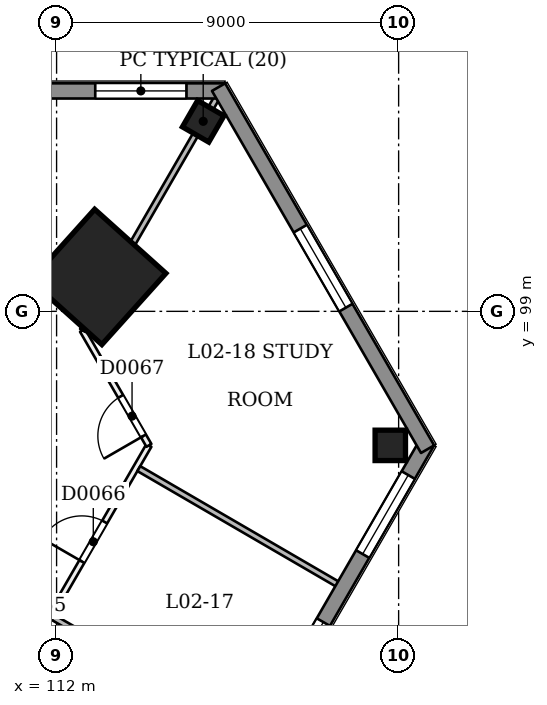
"""IFC4 building model, lengths in metres.
Left out: names, types, materials, properties, quantities, classifications, styles, units other than length and angle.
Written with IfcOpenShell. Run it as: python <this file> out.ifc"""

import sys

from ifc_helpers import new_model, si_unit, direction, frame, frame_2d, origin, origin_2d, place, context, subcontext, project, spatial, rectangle, extrude, element, fill, save


model = new_model("IFC4")
c1 = context("Model", 3, precision=1e-05, world=origin(), true_north=direction((0.0, 1.0)))
c2 = subcontext(c1, "Body", "Model", "MODEL_VIEW")
j1 = project(units=[si_unit("LENGTHUNIT", "METRE"), si_unit("PLANEANGLEUNIT", "RADIAN")], contexts=[c1])
p1 = place(None, origin())
s1 = spatial("IfcSite", under=j1, at=p1, CompositionType="ELEMENT")
p2 = place(p1, origin())
s2 = spatial("IfcBuilding", under=s1, at=p2, CompositionType="ELEMENT")
p3 = place(p2, frame((0.0, 0.0, 13.5)))
s3 = spatial("IfcBuildingStorey", under=s2, at=p3, CompositionType="ELEMENT", Elevation=13.5)
p4 = place(p3, frame((113.131, 99.895, 0.0), z_axis=(-0.028361930921, 0.009273212596, 0.999554705057), x_axis=(0.498900930689, -0.866374802629, 0.022193754232)))
e1 = element("IfcColumn", 1, at=p4, inside=s3, PredefinedType="COLUMN", context=c2, shape_type="SweptSolid", body=[
    extrude(rectangle(XDim=2.52, YDim=2.52, at=origin_2d()), origin(), (0.0, 0.0, 1.0), 4.502),
])
for number, where, z_axis, x_axis in (
    (2, (115.858, 104.0, 0.0), (0.0, 0.0, 1.0), (0.5, 0.866, 0.0)),
    (3, (120.781, 95.474, 0.0), (0.0, 0.0, 1.0), (1.745e-08, 1.0, 0.0)),
):
    element("IfcColumn", number, at=place(p3, frame(where, z_axis=z_axis, x_axis=x_axis)), inside=s3, PredefinedType="COLUMN", context=c2, shape_type="SweptSolid", body=[
        extrude(rectangle(XDim=0.8, YDim=0.8, at=origin_2d()), origin(), (0.0, 0.0, 1.0), 4.5),
    ])
p5 = place(p3, frame((86.747, 47.526, 0.0), z_axis=(0.0, 0.0, 1.0), x_axis=(0.500000085768, 0.866025354266, 0.0)))
e4 = element("IfcWall", 4, at=p5, inside=s3, PredefinedType="PARTITIONING", context=c2, shape_type="SweptSolid", body=[
    extrude(rectangle(XDim=55.365, YDim=0.15, at=frame_2d((27.682, 0.0))), origin(), (0.0, 0.0, 1.0), 4.05),
])
p6 = place(p5, frame((0.97, 0.0, 0.0)))
e5 = element("IfcOpeningElement", 5, at=p6, cuts=e4, PredefinedType="OPENING", context=c2, shape_type="SweptSolid", body=[
    extrude(rectangle(XDim=1.2, YDim=2.1, at=frame_2d((0.6, 1.05))), frame((0.0, 0.085, 0.0), z_axis=(0.0, -1.0, 0.0), x_axis=(1.0, 0.0, 0.0)), (0.0, 0.0, 1.0), 0.171),
])
p7 = place(p5, frame((11.332, 0.0, 0.0)))
e6 = element("IfcOpeningElement", 6, at=p7, cuts=e4, PredefinedType="OPENING", context=c2, shape_type="SweptSolid", body=[
    extrude(rectangle(XDim=1.2, YDim=2.1, at=frame_2d((0.6, 1.05))), frame((0.0, 0.085, 0.0), z_axis=(0.0, -1.0, 0.0), x_axis=(1.0, 0.0, 0.0)), (0.0, 0.0, 1.0), 0.171),
])
p8 = place(p5, frame((29.332, 0.0, 0.0)))
e7 = element("IfcOpeningElement", 7, at=p8, cuts=e4, PredefinedType="OPENING", context=c2, shape_type="SweptSolid", body=[
    extrude(rectangle(XDim=1.2, YDim=2.1, at=frame_2d((0.6, 1.05))), frame((0.0, 0.085, 0.0), z_axis=(0.0, -1.0, 0.0), x_axis=(1.0, 0.0, 0.0)), (0.0, 0.0, 1.0), 0.171),
])
p9 = place(p5, frame((42.132, 0.0, 0.0)))
e8 = element("IfcOpeningElement", 8, at=p9, cuts=e4, PredefinedType="OPENING", context=c2, shape_type="SweptSolid", body=[
    extrude(rectangle(XDim=1.2, YDim=2.1, at=frame_2d((0.6, 1.05))), frame((0.0, 0.085, 0.0), z_axis=(0.0, -1.0, 0.0), x_axis=(1.0, 0.0, 0.0)), (0.0, 0.0, 1.0), 0.171),
])
p10 = place(p5, frame((46.569, 0.0, 0.0)))
e9 = element("IfcOpeningElement", 9, at=p10, cuts=e4, PredefinedType="OPENING", context=c2, shape_type="SweptSolid", body=[
    extrude(rectangle(XDim=1.0, YDim=2.1, at=frame_2d((0.5, 1.05))), frame((0.0, 0.085, 0.0), z_axis=(0.0, -1.0, 0.0), x_axis=(1.0, 0.0, 0.0)), (0.0, 0.0, 1.0), 0.171),
])
p11 = place(p5, frame((48.819, 0.0, 0.0)))
e10 = element("IfcOpeningElement", 10, at=p11, cuts=e4, PredefinedType="OPENING", context=c2, shape_type="SweptSolid", body=[
    extrude(rectangle(XDim=1.0, YDim=2.1, at=frame_2d((0.5, 1.05))), frame((0.0, 0.085, 0.0), z_axis=(0.0, -1.0, 0.0), x_axis=(1.0, 0.0, 0.0)), (0.0, 0.0, 1.0), 0.171),
])
p12 = place(p5, frame((51.837, 0.0, 0.0)))
e11 = element("IfcOpeningElement", 11, at=p12, cuts=e4, PredefinedType="OPENING", context=c2, shape_type="SweptSolid", body=[
    extrude(rectangle(XDim=1.2, YDim=2.1, at=frame_2d((0.6, 1.05))), frame((0.0, 0.085, 0.0), z_axis=(0.0, -1.0, 0.0), x_axis=(1.0, 0.0, 0.0)), (0.0, 0.0, 1.0), 0.171),
])
p13 = place(p3, frame((114.43, 95.474, 0.0), z_axis=(0.0, 0.0, 1.0), x_axis=(-0.500008701212, 0.866020380079, 0.0)))
e12 = element("IfcWall", 12, at=p13, inside=s3, PredefinedType="PARTITIONING", context=c2, shape_type="SweptSolid", body=[
    extrude(rectangle(XDim=3.495, YDim=0.15, at=frame_2d((1.747, 0.0))), origin(), (0.0, 0.0, 1.0), 4.05),
])
p14 = place(p13, frame((0.288, 0.0, 0.0)))
e13 = element("IfcOpeningElement", 13, at=p14, cuts=e12, PredefinedType="OPENING", context=c2, shape_type="SweptSolid", body=[
    extrude(rectangle(XDim=1.2, YDim=2.1, at=frame_2d((0.6, 1.05))), frame((0.0, 0.085, 0.0), z_axis=(0.0, -1.0, 0.0), x_axis=(1.0, 0.0, 0.0)), (0.0, 0.0, 1.0), 0.171),
])
p15 = place(p3, frame((112.682, 98.5, 0.0), z_axis=(0.0, 0.0, 1.0), x_axis=(0.500126914667, 0.865952117167, 0.0)))
e14 = element("IfcWall", 14, at=p15, inside=s3, PredefinedType="PARTITIONING", context=c2, shape_type="SweptSolid", body=[
    extrude(rectangle(XDim=1.08, YDim=0.15, at=frame_2d((0.54, 0.0))), origin(), (0.0, 0.0, 1.0), 4.05),
])
p16 = place(p3, frame((113.195, 99.538, 0.0), z_axis=(0.0, 0.0, 1.0), x_axis=(-0.866017533419, 0.500013631625, 0.0)))
e15 = element("IfcWall", 15, at=p16, inside=s3, PredefinedType="PARTITIONING", context=c2, shape_type="SweptSolid", body=[
    extrude(rectangle(XDim=2.25, YDim=0.15, at=frame_2d((1.125, 0.0))), origin(), (0.0, 0.0, 1.0), 4.05),
])
p17 = place(p3, frame((117.381, 87.786, 0.0), z_axis=(0.0, 0.0, 1.0), x_axis=(-0.866042250622, 0.499970819286, 0.0)))
e16 = element("IfcWall", 16, at=p17, inside=s3, PredefinedType="PARTITIONING", context=c2, shape_type="SweptSolid", body=[
    extrude(rectangle(XDim=6.325, YDim=0.15, at=frame_2d((3.163, 0.0))), origin(), (0.0, 0.0, 1.0), 4.05),
])
p18 = place(p3, frame((119.631, 91.683, 0.0), z_axis=(0.0, 0.0, 1.0), x_axis=(-0.864489243455, 0.502651318462, 0.0)))
e17 = element("IfcWall", 17, at=p18, inside=s3, PredefinedType="PARTITIONING", context=c2, shape_type="SweptSolid", body=[
    extrude(rectangle(XDim=6.325, YDim=0.15, at=frame_2d((3.163, 0.0))), origin(), (0.0, 0.0, 1.0), 4.05),
])
p19 = place(p3, frame((116.377, 104.9, 0.0), z_axis=(0.0, 0.0, 1.0), x_axis=(-0.500004896655, -0.866022576681, 0.0)))
e18 = element("IfcWall", 18, at=p19, inside=s3, PredefinedType="PARTITIONING", context=c2, shape_type="SweptSolid", body=[
    extrude(rectangle(XDim=6.235, YDim=0.15, at=frame_2d((3.118, 0.0))), origin(), (0.0, 0.0, 1.0), 4.05),
])
p20 = place(p3, frame((53.565, 104.8, 0.0), z_axis=(0.0, 0.0, 1.0), x_axis=(1.0, 0.0, 0.0)))
e19 = element("IfcWall", 19, at=p20, inside=s3, PredefinedType="SOLIDWALL", context=c2, shape_type="SweptSolid", body=[
    extrude(rectangle(XDim=62.871, YDim=0.4, at=frame_2d((31.435, 0.0))), origin(), (0.0, 0.0, 1.0), 4.05),
])
p21 = place(p20, frame((59.452, 0.0, 0.9)))
e20 = element("IfcOpeningElement", 20, at=p21, cuts=e19, PredefinedType="OPENING", context=c2, shape_type="SweptSolid", body=[
    extrude(rectangle(XDim=2.4, YDim=1.5, at=frame_2d((1.2, 0.75))), frame((0.0, 0.21, 0.0), z_axis=(0.0, -1.0, 0.0), x_axis=(1.0, 0.0, 0.0)), (0.0, 0.0, 1.0), 0.421),
])
p22 = place(p20, frame((54.986, 0.0, 0.9)))
e21 = element("IfcOpeningElement", 21, at=p22, cuts=e19, PredefinedType="OPENING", context=c2, shape_type="SweptSolid", body=[
    extrude(rectangle(XDim=2.4, YDim=1.5, at=frame_2d((1.2, 0.75))), frame((0.0, 0.21, 0.0), z_axis=(0.0, -1.0, 0.0), x_axis=(1.0, 0.0, 0.0)), (0.0, 0.0, 1.0), 0.421),
])
p23 = place(p20, frame((45.986, 0.0, 0.9)))
e22 = element("IfcOpeningElement", 22, at=p23, cuts=e19, PredefinedType="OPENING", context=c2, shape_type="SweptSolid", body=[
    extrude(rectangle(XDim=2.4, YDim=1.5, at=frame_2d((1.2, 0.75))), frame((0.0, 0.21, 0.0), z_axis=(0.0, -1.0, 0.0), x_axis=(1.0, 0.0, 0.0)), (0.0, 0.0, 1.0), 0.421),
])
p24 = place(p20, frame((14.486, 0.0, 0.9)))
e23 = element("IfcOpeningElement", 23, at=p24, cuts=e19, PredefinedType="OPENING", context=c2, shape_type="SweptSolid", body=[
    extrude(rectangle(XDim=2.4, YDim=1.5, at=frame_2d((1.2, 0.75))), frame((0.0, 0.21, 0.0), z_axis=(0.0, -1.0, 0.0), x_axis=(1.0, 0.0, 0.0)), (0.0, 0.0, 1.0), 0.421),
])
p25 = place(p20, frame((1.018, 0.0, 0.9)))
e24 = element("IfcOpeningElement", 24, at=p25, cuts=e19, PredefinedType="OPENING", context=c2, shape_type="SweptSolid", body=[
    extrude(rectangle(XDim=2.4, YDim=1.5, at=frame_2d((1.2, 0.75))), frame((0.0, 0.21, 0.0), z_axis=(0.0, -1.0, 0.0), x_axis=(1.0, 0.0, 0.0)), (0.0, 0.0, 1.0), 0.421),
])
p26 = place(p3, frame((121.762, 95.574, 0.0), z_axis=(0.0, 0.0, 1.0), x_axis=(-0.499997306052, -0.866026959131, 0.0)))
e25 = element("IfcWall", 25, at=p26, inside=s3, PredefinedType="SOLIDWALL", context=c2, shape_type="SweptSolid", body=[
    extrude(rectangle(XDim=62.87, YDim=0.4, at=frame_2d((31.435, 0.0))), origin(), (0.0, 0.0, 1.0), 4.05),
])
p27 = place(p26, frame((59.452, 0.0, 0.9)))
e26 = element("IfcOpeningElement", 26, at=p27, cuts=e25, PredefinedType="OPENING", context=c2, shape_type="SweptSolid", body=[
    extrude(rectangle(XDim=2.4, YDim=1.5, at=frame_2d((1.2, 0.75))), frame((0.0, 0.21, 0.0), z_axis=(0.0, -1.0, 0.0), x_axis=(1.0, 0.0, 0.0)), (0.0, 0.0, 1.0), 0.421),
])
p28 = place(p26, frame((54.986, 0.0, 0.9)))
e27 = element("IfcOpeningElement", 27, at=p28, cuts=e25, PredefinedType="OPENING", context=c2, shape_type="SweptSolid", body=[
    extrude(rectangle(XDim=2.4, YDim=1.5, at=frame_2d((1.2, 0.75))), frame((0.0, 0.21, 0.0), z_axis=(0.0, -1.0, 0.0), x_axis=(1.0, 0.0, 0.0)), (0.0, 0.0, 1.0), 0.421),
])
p29 = place(p26, frame((50.486, 0.0, 0.9)))
e28 = element("IfcOpeningElement", 28, at=p29, cuts=e25, PredefinedType="OPENING", context=c2, shape_type="SweptSolid", body=[
    extrude(rectangle(XDim=2.4, YDim=1.5, at=frame_2d((1.2, 0.75))), frame((0.0, 0.21, 0.0), z_axis=(0.0, -1.0, 0.0), x_axis=(1.0, 0.0, 0.0)), (0.0, 0.0, 1.0), 0.421),
])
p30 = place(p26, frame((45.986, 0.0, 0.9)))
e29 = element("IfcOpeningElement", 29, at=p30, cuts=e25, PredefinedType="OPENING", context=c2, shape_type="SweptSolid", body=[
    extrude(rectangle(XDim=2.4, YDim=1.5, at=frame_2d((1.2, 0.75))), frame((0.0, 0.21, 0.0), z_axis=(0.0, -1.0, 0.0), x_axis=(1.0, 0.0, 0.0)), (0.0, 0.0, 1.0), 0.421),
])
p31 = place(p26, frame((41.486, 0.0, 0.9)))
e30 = element("IfcOpeningElement", 30, at=p31, cuts=e25, PredefinedType="OPENING", context=c2, shape_type="SweptSolid", body=[
    extrude(rectangle(XDim=2.4, YDim=1.5, at=frame_2d((1.2, 0.75))), frame((0.0, 0.21, 0.0), z_axis=(0.0, -1.0, 0.0), x_axis=(1.0, 0.0, 0.0)), (0.0, 0.0, 1.0), 0.421),
])
p32 = place(p26, frame((36.986, 0.0, 0.9)))
e31 = element("IfcOpeningElement", 31, at=p32, cuts=e25, PredefinedType="OPENING", context=c2, shape_type="SweptSolid", body=[
    extrude(rectangle(XDim=2.4, YDim=1.5, at=frame_2d((1.2, 0.75))), frame((0.0, 0.21, 0.0), z_axis=(0.0, -1.0, 0.0), x_axis=(1.0, 0.0, 0.0)), (0.0, 0.0, 1.0), 0.421),
])
p33 = place(p26, frame((23.486, 0.0, 0.9)))
e32 = element("IfcOpeningElement", 32, at=p33, cuts=e25, PredefinedType="OPENING", context=c2, shape_type="SweptSolid", body=[
    extrude(rectangle(XDim=2.4, YDim=1.5, at=frame_2d((1.2, 0.75))), frame((0.0, 0.21, 0.0), z_axis=(0.0, -1.0, 0.0), x_axis=(1.0, 0.0, 0.0)), (0.0, 0.0, 1.0), 0.421),
])
p34 = place(p26, frame((18.986, 0.0, 0.9)))
e33 = element("IfcOpeningElement", 33, at=p34, cuts=e25, PredefinedType="OPENING", context=c2, shape_type="SweptSolid", body=[
    extrude(rectangle(XDim=2.4, YDim=1.5, at=frame_2d((1.2, 0.75))), frame((0.0, 0.21, 0.0), z_axis=(0.0, -1.0, 0.0), x_axis=(1.0, 0.0, 0.0)), (0.0, 0.0, 1.0), 0.421),
])
p35 = place(p26, frame((14.486, 0.0, 0.9)))
e34 = element("IfcOpeningElement", 34, at=p35, cuts=e25, PredefinedType="OPENING", context=c2, shape_type="SweptSolid", body=[
    extrude(rectangle(XDim=2.4, YDim=1.5, at=frame_2d((1.2, 0.75))), frame((0.0, 0.21, 0.0), z_axis=(0.0, -1.0, 0.0), x_axis=(1.0, 0.0, 0.0)), (0.0, 0.0, 1.0), 0.421),
])
p36 = place(p26, frame((5.486, 0.0, 0.9)))
e35 = element("IfcOpeningElement", 35, at=p36, cuts=e25, PredefinedType="OPENING", context=c2, shape_type="SweptSolid", body=[
    extrude(rectangle(XDim=2.4, YDim=1.5, at=frame_2d((1.2, 0.75))), frame((0.0, 0.21, 0.0), z_axis=(0.0, -1.0, 0.0), x_axis=(1.0, 0.0, 0.0)), (0.0, 0.0, 1.0), 0.421),
])
p37 = place(p26, frame((1.018, 0.0, 0.9)))
e36 = element("IfcOpeningElement", 36, at=p37, cuts=e25, PredefinedType="OPENING", context=c2, shape_type="SweptSolid", body=[
    extrude(rectangle(XDim=2.4, YDim=1.5, at=frame_2d((1.2, 0.75))), frame((0.0, 0.21, 0.0), z_axis=(0.0, -1.0, 0.0), x_axis=(1.0, 0.0, 0.0)), (0.0, 0.0, 1.0), 0.421),
])
p38 = place(p3, frame((116.262, 104.9, 0.0), z_axis=(0.0, 0.0, 1.0), x_axis=(0.50000615651, -0.866021849293, 0.0)))
e37 = element("IfcWall", 37, at=p38, inside=s3, PredefinedType="SOLIDWALL", context=c2, shape_type="SweptSolid", body=[
    extrude(rectangle(XDim=11.0, YDim=0.4, at=frame_2d((5.5, 0.0))), origin(), (0.0, 0.0, 1.0), 4.05),
])
p39 = place(p38, frame((4.3, 0.0, 0.9)))
e38 = element("IfcOpeningElement", 38, at=p39, cuts=e37, PredefinedType="OPENING", context=c2, shape_type="SweptSolid", body=[
    extrude(rectangle(XDim=2.4, YDim=1.5, at=frame_2d((1.2, 0.75))), frame((0.0, 0.21, 0.0), z_axis=(0.0, -1.0, 0.0), x_axis=(1.0, 0.0, 0.0)), (0.0, 0.0, 1.0), 0.421),
])
p40 = place(p12, origin())
e39 = element("IfcDoor", 39, at=p40, inside=s3, OperationType="SINGLE_SWING_LEFT", PredefinedType="NOTDEFINED", context=c2, shape_type="SweptSolid", body=[
    extrude(rectangle(XDim=1.2, YDim=2.1, at=frame_2d((0.6, 1.05))), frame((0.0, 0.025, 0.0), z_axis=(0.0, -1.0, 0.0), x_axis=(1.0, 0.0, 0.0)), (0.0, 0.0, 1.0), 0.05),
])
fill(e11, e39)
p41 = place(p14, origin())
e40 = element("IfcDoor", 40, at=p41, inside=s3, OperationType="SINGLE_SWING_LEFT", PredefinedType="NOTDEFINED", context=c2, shape_type="SweptSolid", body=[
    extrude(rectangle(XDim=1.2, YDim=2.1, at=frame_2d((0.6, 1.05))), frame((0.0, 0.025, 0.0), z_axis=(0.0, -1.0, 0.0), x_axis=(1.0, 0.0, 0.0)), (0.0, 0.0, 1.0), 0.05),
])
fill(e13, e40)
p42 = place(p21, origin())
e41 = element("IfcWindow", 41, at=p42, inside=s3, PartitioningType="SINGLE_PANEL", PredefinedType="WINDOW", context=c2, shape_type="SweptSolid", body=[
    extrude(rectangle(XDim=2.4, YDim=1.5, at=frame_2d((1.2, 0.75))), frame((0.0, 0.03, 0.0), z_axis=(0.0, -1.0, 0.0), x_axis=(1.0, 0.0, 0.0)), (0.0, 0.0, 1.0), 0.06),
])
fill(e20, e41)
p43 = place(p36, origin())
e42 = element("IfcWindow", 42, at=p43, inside=s3, PartitioningType="SINGLE_PANEL", PredefinedType="WINDOW", context=c2, shape_type="SweptSolid", body=[
    extrude(rectangle(XDim=2.4, YDim=1.5, at=frame_2d((1.2, 0.75))), frame((0.0, 0.03, 0.0), z_axis=(0.0, -1.0, 0.0), x_axis=(1.0, 0.0, 0.0)), (0.0, 0.0, 1.0), 0.06),
])
fill(e35, e42)
p44 = place(p37, origin())
e43 = element("IfcWindow", 43, at=p44, inside=s3, PartitioningType="SINGLE_PANEL", PredefinedType="WINDOW", context=c2, shape_type="SweptSolid", body=[
    extrude(rectangle(XDim=2.4, YDim=1.5, at=frame_2d((1.2, 0.75))), frame((0.0, 0.03, 0.0), z_axis=(0.0, -1.0, 0.0), x_axis=(1.0, 0.0, 0.0)), (0.0, 0.0, 1.0), 0.06),
])
fill(e36, e43)
p45 = place(p39, origin())
e44 = element("IfcWindow", 44, at=p45, inside=s3, PartitioningType="SINGLE_PANEL", PredefinedType="WINDOW", context=c2, shape_type="SweptSolid", body=[
    extrude(rectangle(XDim=2.4, YDim=1.5, at=frame_2d((1.2, 0.75))), frame((0.0, 0.03, 0.0), z_axis=(0.0, -1.0, 0.0), x_axis=(1.0, 0.0, 0.0)), (0.0, 0.0, 1.0), 0.06),
])
fill(e38, e44)
save(model, sys.argv[1])
